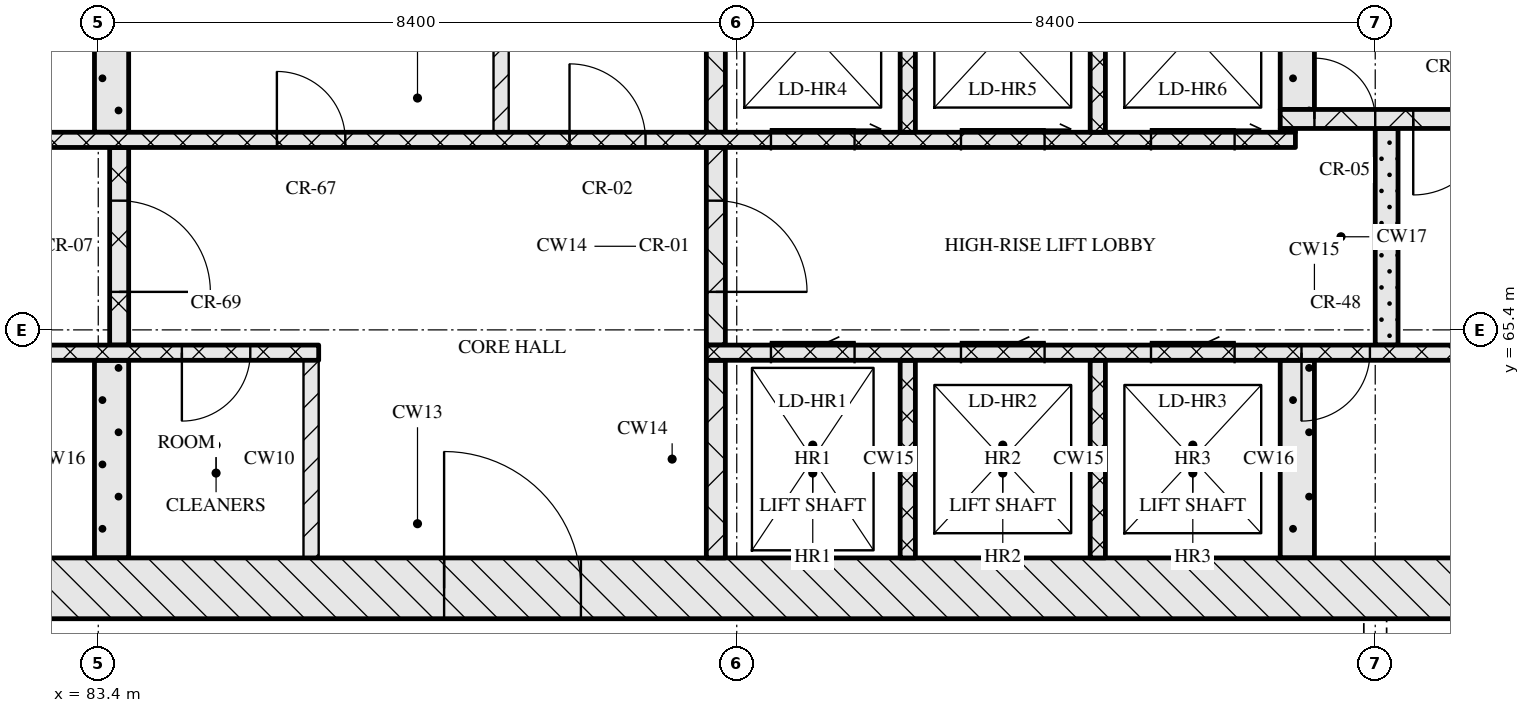
"""IFC4 building model, lengths in metres.
Left out: names, types, materials, properties, quantities, classifications, styles, units other than length and angle.
Written with IfcOpenShell. Run it as: python <this file> out.ifc"""

import sys

from ifc_helpers import new_model, si_unit, direction, frame, frame_2d, origin, place, context, subcontext, project, spatial, rectangle, extrude, element, fill, save


model = new_model("IFC4")
c1 = context("Model", 3, precision=1e-05, world=origin(), true_north=direction((0.0, 1.0)))
c2 = subcontext(c1, "Body", "Model", "MODEL_VIEW")
j1 = project(units=[si_unit("LENGTHUNIT", "METRE"), si_unit("PLANEANGLEUNIT", "RADIAN")], contexts=[c1])
p1 = place(None, origin())
s1 = spatial("IfcSite", under=j1, at=p1, CompositionType="ELEMENT")
p2 = place(p1, origin())
s2 = spatial("IfcBuilding", under=s1, at=p2, CompositionType="ELEMENT")
p3 = place(p2, frame((0.0, 0.0, 158.25)))
s3 = spatial("IfcBuildingStorey", under=s2, at=p3, CompositionType="ELEMENT", Elevation=158.25)
p4 = place(p3, frame((67.0, 62.0, 0.0), z_axis=(0.0, 0.0, 1.0), x_axis=(1.0, 0.0, 0.0)))
e1 = element("IfcWall", 1, at=p4, inside=s3, PredefinedType="SOLIDWALL", context=c2, shape_type="SweptSolid", body=[
    extrude(rectangle(XDim=41.2, YDim=0.8, at=frame_2d((20.6, 0.0))), origin(), (0.0, 0.0, 1.0), 3.32),
])
p5 = place(p4, frame((20.95, 0.0, 0.0)))
e2 = element("IfcOpeningElement", 2, at=p5, cuts=e1, PredefinedType="OPENING", context=c2, shape_type="SweptSolid", body=[
    extrude(rectangle(XDim=1.8, YDim=2.1, at=frame_2d((0.9, 1.05))), frame((0.0, 0.41, 0.0), z_axis=(0.0, -1.0, 0.0), x_axis=(1.0, 0.0, 0.0)), (0.0, 0.0, 1.0), 0.82),
])
p6 = place(p3, frame((83.575, 62.4, 0.0), z_axis=(0.0, 0.0, 1.0), x_axis=(0.0, 1.0, 0.0)))
e3 = element("IfcWall", 3, at=p6, inside=s3, PredefinedType="SOLIDWALL", context=c2, shape_type="SweptSolid", body=[
    extrude(rectangle(XDim=2.6, YDim=0.45, at=frame_2d((1.3, 0.0))), origin(), (0.0, 0.0, 1.0), 3.32),
])
p7 = place(p3, frame((86.2, 62.4, 0.0), z_axis=(0.0, 0.0, 1.0), x_axis=(0.0, 1.0, 0.0)))
e4 = element("IfcWall", 4, at=p7, inside=s3, PredefinedType="PARTITIONING", context=c2, shape_type="SweptSolid", body=[
    extrude(rectangle(XDim=2.6, YDim=0.2, at=frame_2d((1.3, 0.0))), origin(), (0.0, 0.0, 1.0), 3.32),
])
p8 = place(p3, frame((91.525, 62.4, 0.0), z_axis=(0.0, 0.0, 1.0), x_axis=(0.0, 1.0, 0.0)))
e5 = element("IfcWall", 5, at=p8, inside=s3, PredefinedType="SOLIDWALL", context=c2, shape_type="SweptSolid", body=[
    extrude(rectangle(XDim=2.6, YDim=0.25, at=frame_2d((1.3, 0.0))), origin(), (0.0, 0.0, 1.0), 3.32),
])
for number, where, z_axis, x_axis in (
    (6, (94.05, 62.4, 0.0), (0.0, 0.0, 1.0), (0.0, 1.0, 0.0)),
    (7, (96.55, 62.4, 0.0), (0.0, 0.0, 1.0), (0.0, 1.0, 0.0)),
):
    element("IfcWall", number, at=place(p3, frame(where, z_axis=z_axis, x_axis=x_axis)), inside=s3, PredefinedType="SOLIDWALL", context=c2, shape_type="SweptSolid", body=[
        extrude(rectangle(XDim=2.6, YDim=0.2, at=frame_2d((1.3, 0.0))), origin(), (0.0, 0.0, 1.0), 3.32),
    ])
p9 = place(p3, frame((99.175, 62.4, 0.0), z_axis=(0.0, 0.0, 1.0), x_axis=(0.0, 1.0, 0.0)))
e8 = element("IfcWall", 8, at=p9, inside=s3, PredefinedType="SOLIDWALL", context=c2, shape_type="SweptSolid", body=[
    extrude(rectangle(XDim=2.6, YDim=0.45, at=frame_2d((1.3, 0.0))), origin(), (0.0, 0.0, 1.0), 3.32),
])
p10 = place(p3, frame((67.8, 65.1, 0.0), z_axis=(0.0, 0.0, 1.0), x_axis=(1.0, 0.0, 0.0)))
e9 = element("IfcWall", 9, at=p10, inside=s3, PredefinedType="SOLIDWALL", context=c2, shape_type="SweptSolid", body=[
    extrude(rectangle(XDim=18.5, YDim=0.2, at=frame_2d((9.25, 0.0))), origin(), (0.0, 0.0, 1.0), 3.32),
])
p11 = place(p10, frame((7.27, 0.0, 0.0)))
e10 = element("IfcOpeningElement", 10, at=p11, cuts=e9, PredefinedType="OPENING", context=c2, shape_type="SweptSolid", body=[
    extrude(rectangle(XDim=0.9, YDim=2.1, at=frame_2d((0.45, 1.05))), frame((0.0, 0.11, 0.0), z_axis=(0.0, -1.0, 0.0), x_axis=(1.0, 0.0, 0.0)), (0.0, 0.0, 1.0), 0.22),
])
p12 = place(p10, frame((10.1, 0.0, 0.0)))
e11 = element("IfcOpeningElement", 11, at=p12, cuts=e9, PredefinedType="OPENING", context=c2, shape_type="SweptSolid", body=[
    extrude(rectangle(XDim=0.9, YDim=2.1, at=frame_2d((0.45, 1.05))), frame((0.0, 0.11, 0.0), z_axis=(0.0, -1.0, 0.0), x_axis=(1.0, 0.0, 0.0)), (0.0, 0.0, 1.0), 0.22),
])
p13 = place(p10, frame((13.81, 0.0, 0.0)))
e12 = element("IfcOpeningElement", 12, at=p13, cuts=e9, PredefinedType="OPENING", context=c2, shape_type="SweptSolid", body=[
    extrude(rectangle(XDim=0.9, YDim=2.1, at=frame_2d((0.45, 1.05))), frame((0.0, 0.11, 0.0), z_axis=(0.0, -1.0, 0.0), x_axis=(1.0, 0.0, 0.0)), (0.0, 0.0, 1.0), 0.22),
])
p14 = place(p10, frame((16.7, 0.0, 0.0)))
e13 = element("IfcOpeningElement", 13, at=p14, cuts=e9, PredefinedType="OPENING", context=c2, shape_type="SweptSolid", body=[
    extrude(rectangle(XDim=0.9, YDim=2.1, at=frame_2d((0.45, 1.05))), frame((0.0, 0.11, 0.0), z_axis=(0.0, -1.0, 0.0), x_axis=(1.0, 0.0, 0.0)), (0.0, 0.0, 1.0), 0.22),
])
p15 = place(p3, frame((91.4, 65.1, 0.0), z_axis=(0.0, 0.0, 1.0), x_axis=(1.0, 0.0, 0.0)))
e14 = element("IfcWall", 14, at=p15, inside=s3, PredefinedType="SOLIDWALL", context=c2, shape_type="SweptSolid", body=[
    extrude(rectangle(XDim=16.0, YDim=0.2, at=frame_2d((8.0, 0.0))), origin(), (0.0, 0.0, 1.0), 3.32),
])
p16 = place(p15, frame((0.85, 0.0, 0.0)))
e15 = element("IfcOpeningElement", 15, at=p16, cuts=e14, PredefinedType="OPENING", context=c2, shape_type="SweptSolid", body=[
    extrude(rectangle(XDim=1.1, YDim=2.1, at=frame_2d((0.55, 1.05))), frame((0.0, 0.11, 0.0), z_axis=(0.0, -1.0, 0.0), x_axis=(1.0, 0.0, 0.0)), (0.0, 0.0, 1.0), 0.22),
])
p17 = place(p15, frame((3.35, 0.0, 0.0)))
e16 = element("IfcOpeningElement", 16, at=p17, cuts=e14, PredefinedType="OPENING", context=c2, shape_type="SweptSolid", body=[
    extrude(rectangle(XDim=1.1, YDim=2.1, at=frame_2d((0.55, 1.05))), frame((0.0, 0.11, 0.0), z_axis=(0.0, -1.0, 0.0), x_axis=(1.0, 0.0, 0.0)), (0.0, 0.0, 1.0), 0.22),
])
p18 = place(p15, frame((5.85, 0.0, 0.0)))
e17 = element("IfcOpeningElement", 17, at=p18, cuts=e14, PredefinedType="OPENING", context=c2, shape_type="SweptSolid", body=[
    extrude(rectangle(XDim=1.1, YDim=2.1, at=frame_2d((0.55, 1.05))), frame((0.0, 0.11, 0.0), z_axis=(0.0, -1.0, 0.0), x_axis=(1.0, 0.0, 0.0)), (0.0, 0.0, 1.0), 0.22),
])
p19 = place(p15, frame((7.83, 0.0, 0.0)))
e18 = element("IfcOpeningElement", 18, at=p19, cuts=e14, PredefinedType="OPENING", context=c2, shape_type="SweptSolid", body=[
    extrude(rectangle(XDim=0.9, YDim=2.1, at=frame_2d((0.45, 1.05))), frame((0.0, 0.11, 0.0), z_axis=(0.0, -1.0, 0.0), x_axis=(1.0, 0.0, 0.0)), (0.0, 0.0, 1.0), 0.22),
])
p20 = place(p3, frame((83.675, 65.2, 0.0), z_axis=(0.0, 0.0, 1.0), x_axis=(0.0, 1.0, 0.0)))
e19 = element("IfcWall", 19, at=p20, inside=s3, PredefinedType="SOLIDWALL", context=c2, shape_type="SweptSolid", body=[
    extrude(rectangle(XDim=2.6, YDim=0.25, at=frame_2d((1.3, 0.0))), origin(), (0.0, 0.0, 1.0), 3.32),
])
p21 = place(p20, frame((0.7, 0.0, 0.0)))
e20 = element("IfcOpeningElement", 20, at=p21, cuts=e19, PredefinedType="OPENING", context=c2, shape_type="SweptSolid", body=[
    extrude(rectangle(XDim=1.2, YDim=2.1, at=frame_2d((0.6, 1.05))), frame((0.0, 0.135, 0.0), z_axis=(0.0, -1.0, 0.0), x_axis=(1.0, 0.0, 0.0)), (0.0, 0.0, 1.0), 0.27),
])
p22 = place(p3, frame((91.525, 65.2, 0.0), z_axis=(0.0, 0.0, 1.0), x_axis=(0.0, 1.0, 0.0)))
e21 = element("IfcWall", 21, at=p22, inside=s3, PredefinedType="SOLIDWALL", context=c2, shape_type="SweptSolid", body=[
    extrude(rectangle(XDim=2.6, YDim=0.25, at=frame_2d((1.3, 0.0))), origin(), (0.0, 0.0, 1.0), 3.32),
])
p23 = place(p22, frame((0.7, 0.0, 0.0)))
e22 = element("IfcOpeningElement", 22, at=p23, cuts=e21, PredefinedType="OPENING", context=c2, shape_type="SweptSolid", body=[
    extrude(rectangle(XDim=1.2, YDim=2.1, at=frame_2d((0.6, 1.05))), frame((0.0, 0.135, 0.0), z_axis=(0.0, -1.0, 0.0), x_axis=(1.0, 0.0, 0.0)), (0.0, 0.0, 1.0), 0.27),
])
p24 = place(p3, frame((100.35, 65.2, 0.0), z_axis=(0.0, 0.0, 1.0), x_axis=(0.0, 1.0, 0.0)))
e23 = element("IfcWall", 23, at=p24, inside=s3, PredefinedType="SOLIDWALL", context=c2, shape_type="SweptSolid", body=[
    extrude(rectangle(XDim=2.85, YDim=0.3, at=frame_2d((1.425, 0.0))), origin(), (0.0, 0.0, 1.0), 3.32),
])
p25 = place(p3, frame((76.05, 67.9, 0.0), z_axis=(0.0, 0.0, 1.0), x_axis=(1.0, 0.0, 0.0)))
e24 = element("IfcWall", 24, at=p25, inside=s3, PredefinedType="SOLIDWALL", context=c2, shape_type="SweptSolid", body=[
    extrude(rectangle(XDim=23.1, YDim=0.2, at=frame_2d((11.55, 0.0))), origin(), (0.0, 0.0, 1.0), 3.32),
])
p26 = place(p25, frame((3.2, 0.0, 0.0)))
e25 = element("IfcOpeningElement", 25, at=p26, cuts=e24, PredefinedType="OPENING", context=c2, shape_type="SweptSolid", body=[
    extrude(rectangle(XDim=0.9, YDim=2.1, at=frame_2d((0.45, 1.05))), frame((0.0, 0.11, 0.0), z_axis=(0.0, -1.0, 0.0), x_axis=(1.0, 0.0, 0.0)), (0.0, 0.0, 1.0), 0.22),
])
p27 = place(p25, frame((9.7, 0.0, 0.0)))
e26 = element("IfcOpeningElement", 26, at=p27, cuts=e24, PredefinedType="OPENING", context=c2, shape_type="SweptSolid", body=[
    extrude(rectangle(XDim=0.9, YDim=2.1, at=frame_2d((0.45, 1.05))), frame((0.0, 0.11, 0.0), z_axis=(0.0, -1.0, 0.0), x_axis=(1.0, 0.0, 0.0)), (0.0, 0.0, 1.0), 0.22),
])
p28 = place(p25, frame((13.55, 0.0, 0.0)))
e27 = element("IfcOpeningElement", 27, at=p28, cuts=e24, PredefinedType="OPENING", context=c2, shape_type="SweptSolid", body=[
    extrude(rectangle(XDim=1.0, YDim=2.1, at=frame_2d((0.5, 1.05))), frame((0.0, 0.11, 0.0), z_axis=(0.0, -1.0, 0.0), x_axis=(1.0, 0.0, 0.0)), (0.0, 0.0, 1.0), 0.22),
])
p29 = place(p25, frame((16.2, 0.0, 0.0)))
e28 = element("IfcOpeningElement", 28, at=p29, cuts=e24, PredefinedType="OPENING", context=c2, shape_type="SweptSolid", body=[
    extrude(rectangle(XDim=1.1, YDim=2.1, at=frame_2d((0.55, 1.05))), frame((0.0, 0.11, 0.0), z_axis=(0.0, -1.0, 0.0), x_axis=(1.0, 0.0, 0.0)), (0.0, 0.0, 1.0), 0.22),
])
p30 = place(p25, frame((18.7, 0.0, 0.0)))
e29 = element("IfcOpeningElement", 29, at=p30, cuts=e24, PredefinedType="OPENING", context=c2, shape_type="SweptSolid", body=[
    extrude(rectangle(XDim=1.1, YDim=2.1, at=frame_2d((0.55, 1.05))), frame((0.0, 0.11, 0.0), z_axis=(0.0, -1.0, 0.0), x_axis=(1.0, 0.0, 0.0)), (0.0, 0.0, 1.0), 0.22),
])
p31 = place(p25, frame((21.2, 0.0, 0.0)))
e30 = element("IfcOpeningElement", 30, at=p31, cuts=e24, PredefinedType="OPENING", context=c2, shape_type="SweptSolid", body=[
    extrude(rectangle(XDim=1.1, YDim=2.1, at=frame_2d((0.55, 1.05))), frame((0.0, 0.11, 0.0), z_axis=(0.0, -1.0, 0.0), x_axis=(1.0, 0.0, 0.0)), (0.0, 0.0, 1.0), 0.22),
])
p32 = place(p3, frame((83.575, 68.0, 0.0), z_axis=(0.0, 0.0, 1.0), x_axis=(0.0, 1.0, 0.0)))
e31 = element("IfcWall", 31, at=p32, inside=s3, PredefinedType="SOLIDWALL", context=c2, shape_type="SweptSolid", body=[
    extrude(rectangle(XDim=2.6, YDim=0.45, at=frame_2d((1.3, 0.0))), origin(), (0.0, 0.0, 1.0), 3.32),
])
p33 = place(p3, frame((88.7, 68.0, 0.0), z_axis=(0.0, 0.0, 1.0), x_axis=(0.0, 1.0, 0.0)))
e32 = element("IfcWall", 32, at=p33, inside=s3, PredefinedType="PARTITIONING", context=c2, shape_type="SweptSolid", body=[
    extrude(rectangle(XDim=2.6, YDim=0.2, at=frame_2d((1.3, 0.0))), origin(), (0.0, 0.0, 1.0), 3.32),
])
p34 = place(p3, frame((91.525, 68.0, 0.0), z_axis=(0.0, 0.0, 1.0), x_axis=(0.0, 1.0, 0.0)))
e33 = element("IfcWall", 33, at=p34, inside=s3, PredefinedType="SOLIDWALL", context=c2, shape_type="SweptSolid", body=[
    extrude(rectangle(XDim=2.6, YDim=0.25, at=frame_2d((1.3, 0.0))), origin(), (0.0, 0.0, 1.0), 3.32),
])
for number, where, z_axis, x_axis in (
    (34, (94.05, 68.0, 0.0), (0.0, 0.0, 1.0), (0.0, 1.0, 0.0)),
    (35, (96.55, 68.0, 0.0), (0.0, 0.0, 1.0), (0.0, 1.0, 0.0)),
):
    element("IfcWall", number, at=place(p3, frame(where, z_axis=z_axis, x_axis=x_axis)), inside=s3, PredefinedType="SOLIDWALL", context=c2, shape_type="SweptSolid", body=[
        extrude(rectangle(XDim=2.6, YDim=0.2, at=frame_2d((1.3, 0.0))), origin(), (0.0, 0.0, 1.0), 3.32),
    ])
p35 = place(p3, frame((98.95, 68.025, 0.0), z_axis=(0.0, 0.0, 1.0), x_axis=(1.0, 0.0, 0.0)))
e36 = element("IfcWall", 36, at=p35, inside=s3, PredefinedType="SOLIDWALL", context=c2, shape_type="SweptSolid", body=[
    extrude(rectangle(XDim=0.2, YDim=0.05, at=frame_2d((0.1, 0.0))), origin(), (0.0, 0.0, 1.0), 3.32),
])
p36 = place(p3, frame((98.95, 68.175, 0.0), z_axis=(0.0, 0.0, 1.0), x_axis=(1.0, 0.0, 0.0)))
e37 = element("IfcWall", 37, at=p36, inside=s3, PredefinedType="SOLIDWALL", context=c2, shape_type="SweptSolid", body=[
    extrude(rectangle(XDim=8.45, YDim=0.25, at=frame_2d((4.225, 0.0))), origin(), (0.0, 0.0, 1.0), 3.32),
])
p37 = place(p36, frame((0.45, 0.0, 0.0)))
e38 = element("IfcOpeningElement", 38, at=p37, cuts=e37, PredefinedType="OPENING", context=c2, shape_type="SweptSolid", body=[
    extrude(rectangle(XDim=0.8, YDim=2.1, at=frame_2d((0.4, 1.05))), frame((0.0, 0.135, 0.0), z_axis=(0.0, -1.0, 0.0), x_axis=(1.0, 0.0, 0.0)), (0.0, 0.0, 1.0), 0.27),
])
p38 = place(p36, frame((1.75, 0.0, 0.0)))
e39 = element("IfcOpeningElement", 39, at=p38, cuts=e37, PredefinedType="OPENING", context=c2, shape_type="SweptSolid", body=[
    extrude(rectangle(XDim=1.0, YDim=2.1, at=frame_2d((0.5, 1.05))), frame((0.0, 0.135, 0.0), z_axis=(0.0, -1.0, 0.0), x_axis=(1.0, 0.0, 0.0)), (0.0, 0.0, 1.0), 0.27),
])
p39 = place(p3, frame((99.175, 68.3, 0.0), z_axis=(0.0, 0.0, 1.0), x_axis=(0.0, 1.0, 0.0)))
e40 = element("IfcWall", 40, at=p39, inside=s3, PredefinedType="SOLIDWALL", context=c2, shape_type="SweptSolid", body=[
    extrude(rectangle(XDim=2.3, YDim=0.45, at=frame_2d((1.15, 0.0))), origin(), (0.0, 0.0, 1.0), 3.32),
])
p40 = place(p5, origin())
e41 = element("IfcDoor", 41, at=p40, inside=s3, OperationType="DOUBLE_DOOR_SINGLE_SWING", PredefinedType="DOOR", context=c2, shape_type="SweptSolid", body=[
    extrude(rectangle(XDim=1.8, YDim=2.1, at=frame_2d((0.9, 1.05))), frame((0.0, 0.025, 0.0), z_axis=(0.0, -1.0, 0.0), x_axis=(1.0, 0.0, 0.0)), (0.0, 0.0, 1.0), 0.05),
])
fill(e2, e41)
p41 = place(p14, origin())
e42 = element("IfcDoor", 42, at=p41, inside=s3, OperationType="SINGLE_SWING_RIGHT", PredefinedType="DOOR", context=c2, shape_type="SweptSolid", body=[
    extrude(rectangle(XDim=0.9, YDim=2.1, at=frame_2d((0.45, 1.05))), frame((0.0, 0.025, 0.0), z_axis=(0.0, -1.0, 0.0), x_axis=(1.0, 0.0, 0.0)), (0.0, 0.0, 1.0), 0.05),
])
fill(e13, e42)
p42 = place(p16, origin())
e43 = element("IfcDoor", 43, at=p42, inside=s3, OperationType="SLIDING_TO_LEFT", PredefinedType="DOOR", context=c2, shape_type="SweptSolid", body=[
    extrude(rectangle(XDim=1.1, YDim=2.1, at=frame_2d((0.55, 1.05))), frame((0.0, 0.025, 0.0), z_axis=(0.0, -1.0, 0.0), x_axis=(1.0, 0.0, 0.0)), (0.0, 0.0, 1.0), 0.05),
])
fill(e15, e43)
p43 = place(p17, origin())
e44 = element("IfcDoor", 44, at=p43, inside=s3, OperationType="SLIDING_TO_LEFT", PredefinedType="DOOR", context=c2, shape_type="SweptSolid", body=[
    extrude(rectangle(XDim=1.1, YDim=2.1, at=frame_2d((0.55, 1.05))), frame((0.0, 0.025, 0.0), z_axis=(0.0, -1.0, 0.0), x_axis=(1.0, 0.0, 0.0)), (0.0, 0.0, 1.0), 0.05),
])
fill(e16, e44)
p44 = place(p18, origin())
e45 = element("IfcDoor", 45, at=p44, inside=s3, OperationType="SLIDING_TO_LEFT", PredefinedType="DOOR", context=c2, shape_type="SweptSolid", body=[
    extrude(rectangle(XDim=1.1, YDim=2.1, at=frame_2d((0.55, 1.05))), frame((0.0, 0.025, 0.0), z_axis=(0.0, -1.0, 0.0), x_axis=(1.0, 0.0, 0.0)), (0.0, 0.0, 1.0), 0.05),
])
fill(e17, e45)
p45 = place(p19, origin())
e46 = element("IfcDoor", 46, at=p45, inside=s3, OperationType="SINGLE_SWING_RIGHT", PredefinedType="DOOR", context=c2, shape_type="SweptSolid", body=[
    extrude(rectangle(XDim=0.9, YDim=2.1, at=frame_2d((0.45, 1.05))), frame((0.0, 0.025, 0.0), z_axis=(0.0, -1.0, 0.0), x_axis=(1.0, 0.0, 0.0)), (0.0, 0.0, 1.0), 0.05),
])
fill(e18, e46)
p46 = place(p21, origin())
e47 = element("IfcDoor", 47, at=p46, inside=s3, OperationType="SINGLE_SWING_RIGHT", PredefinedType="DOOR", context=c2, shape_type="SweptSolid", body=[
    extrude(rectangle(XDim=1.2, YDim=2.1, at=frame_2d((0.6, 1.05))), frame((0.0, 0.025, 0.0), z_axis=(0.0, -1.0, 0.0), x_axis=(1.0, 0.0, 0.0)), (0.0, 0.0, 1.0), 0.05),
])
fill(e20, e47)
p47 = place(p23, origin())
e48 = element("IfcDoor", 48, at=p47, inside=s3, OperationType="SINGLE_SWING_RIGHT", PredefinedType="DOOR", context=c2, shape_type="SweptSolid", body=[
    extrude(rectangle(XDim=1.2, YDim=2.1, at=frame_2d((0.6, 1.05))), frame((0.0, 0.025, 0.0), z_axis=(0.0, -1.0, 0.0), x_axis=(1.0, 0.0, 0.0)), (0.0, 0.0, 1.0), 0.05),
])
fill(e22, e48)
p48 = place(p27, origin())
e49 = element("IfcDoor", 49, at=p48, inside=s3, OperationType="SINGLE_SWING_LEFT", PredefinedType="DOOR", context=c2, shape_type="SweptSolid", body=[
    extrude(rectangle(XDim=0.9, YDim=2.1, at=frame_2d((0.45, 1.05))), frame((0.0, 0.025, 0.0), z_axis=(0.0, -1.0, 0.0), x_axis=(1.0, 0.0, 0.0)), (0.0, 0.0, 1.0), 0.05),
])
fill(e26, e49)
p49 = place(p28, origin())
e50 = element("IfcDoor", 50, at=p49, inside=s3, OperationType="SINGLE_SWING_LEFT", PredefinedType="DOOR", context=c2, shape_type="SweptSolid", body=[
    extrude(rectangle(XDim=1.0, YDim=2.1, at=frame_2d((0.5, 1.05))), frame((0.0, 0.025, 0.0), z_axis=(0.0, -1.0, 0.0), x_axis=(1.0, 0.0, 0.0)), (0.0, 0.0, 1.0), 0.05),
])
fill(e27, e50)
p50 = place(p29, origin())
e51 = element("IfcDoor", 51, at=p50, inside=s3, OperationType="SLIDING_TO_RIGHT", PredefinedType="DOOR", context=c2, shape_type="SweptSolid", body=[
    extrude(rectangle(XDim=1.1, YDim=2.1, at=frame_2d((0.55, 1.05))), frame((0.0, 0.025, 0.0), z_axis=(0.0, -1.0, 0.0), x_axis=(1.0, 0.0, 0.0)), (0.0, 0.0, 1.0), 0.05),
])
fill(e28, e51)
p51 = place(p30, origin())
e52 = element("IfcDoor", 52, at=p51, inside=s3, OperationType="SLIDING_TO_RIGHT", PredefinedType="DOOR", context=c2, shape_type="SweptSolid", body=[
    extrude(rectangle(XDim=1.1, YDim=2.1, at=frame_2d((0.55, 1.05))), frame((0.0, 0.025, 0.0), z_axis=(0.0, -1.0, 0.0), x_axis=(1.0, 0.0, 0.0)), (0.0, 0.0, 1.0), 0.05),
])
fill(e29, e52)
p52 = place(p31, origin())
e53 = element("IfcDoor", 53, at=p52, inside=s3, OperationType="SLIDING_TO_RIGHT", PredefinedType="DOOR", context=c2, shape_type="SweptSolid", body=[
    extrude(rectangle(XDim=1.1, YDim=2.1, at=frame_2d((0.55, 1.05))), frame((0.0, 0.025, 0.0), z_axis=(0.0, -1.0, 0.0), x_axis=(1.0, 0.0, 0.0)), (0.0, 0.0, 1.0), 0.05),
])
fill(e30, e53)
p53 = place(p37, origin())
e54 = element("IfcDoor", 54, at=p53, inside=s3, OperationType="SINGLE_SWING_LEFT", PredefinedType="DOOR", context=c2, shape_type="SweptSolid", body=[
    extrude(rectangle(XDim=0.8, YDim=2.1, at=frame_2d((0.4, 1.05))), frame((0.0, 0.025, 0.0), z_axis=(0.0, -1.0, 0.0), x_axis=(1.0, 0.0, 0.0)), (0.0, 0.0, 1.0), 0.05),
])
fill(e38, e54)
p54 = place(p38, origin())
e55 = element("IfcDoor", 55, at=p54, inside=s3, OperationType="SINGLE_SWING_RIGHT", PredefinedType="DOOR", context=c2, shape_type="SweptSolid", body=[
    extrude(rectangle(XDim=1.0, YDim=2.1, at=frame_2d((0.5, 1.05))), frame((0.0, 0.025, 0.0), z_axis=(0.0, -1.0, 0.0), x_axis=(1.0, 0.0, 0.0)), (0.0, 0.0, 1.0), 0.05),
])
fill(e39, e55)
save(model, sys.argv[1])
